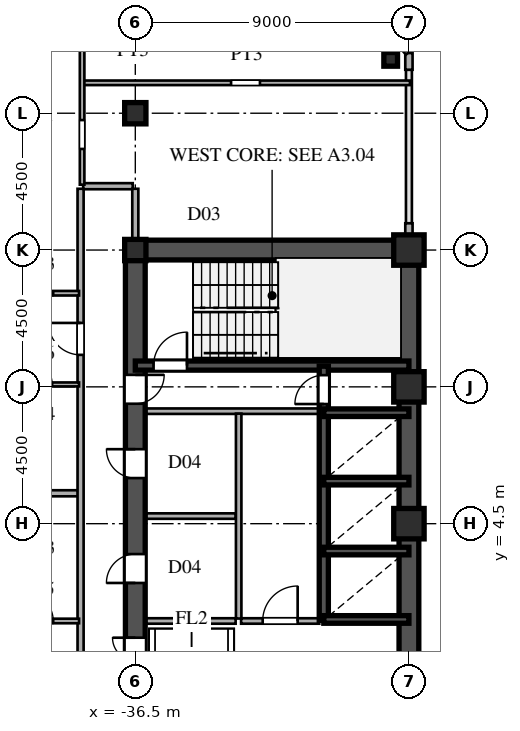
"""IFC4 building model, lengths in metres.
Left out: names, types, materials, properties, quantities, classifications, styles, units other than length and angle.
Written with IfcOpenShell. Run it as: python <this file> out.ifc"""

import sys

from ifc_helpers import new_model, si_unit, direction, frame, frame_2d, origin, origin_2d, place, context, subcontext, project, spatial, rectangle, hollow_rectangle, i_section, extrude, source, transform, mapped, element, fill, save


model = new_model("IFC4")
c1 = context("Model", 3, precision=1e-05, world=origin(), true_north=direction((0.0, 1.0)))
c2 = subcontext(c1, "Body", "Model", "MODEL_VIEW")
j1 = project(units=[si_unit("LENGTHUNIT", "METRE"), si_unit("PLANEANGLEUNIT", "RADIAN")], contexts=[c1])
p1 = place(None, origin())
s1 = spatial("IfcSite", under=j1, at=p1, CompositionType="ELEMENT")
p2 = place(p1, origin())
s2 = spatial("IfcBuilding", under=s1, at=p2, CompositionType="ELEMENT")
p3 = place(p2, frame((0.0, 0.0, 114.0)))
s3 = spatial("IfcBuildingStorey", under=s2, at=p3, CompositionType="ELEMENT", Elevation=114.0)
m1 = source(origin(), c2, "Body", "SweptSolid", [
    extrude(hollow_rectangle(XDim=1.0, YDim=1.0, WallThickness=0.042, at=origin_2d()), origin(), (0.0, 0.0, 1.0), 3.6),
])
for number, where, z_axis, x_axis in (
    (1, (-27.5, 4.5, 0.0), (0.0, 0.0, 1.0), (1.0, 0.0, 0.0)),
    (2, (-27.5, 9.0, 0.0), (0.0, 0.0, 1.0), (1.0, 0.0, 0.0)),
    (3, (-27.5, 13.5, 0.0), (0.0, 0.0, 1.0), (1.0, 0.0, 0.0)),
):
    element("IfcColumn", number, at=place(p3, frame(where, z_axis=z_axis, x_axis=x_axis)), inside=s3, PredefinedType="COLUMN", context=c2, shape_type="MappedRepresentation", body=[
        mapped(m1, transform((0.0, 0.0, 0.0), scale=1.0)),
    ])
m2 = source(origin(), c2, "Body", "SweptSolid", [
    extrude(i_section(OverallWidth=0.7, OverallDepth=0.7, WebThickness=0.028, FlangeThickness=0.045, at=origin_2d()), origin(), (0.0, 0.0, 1.0), 3.6),
])
for number, where, z_axis, x_axis in (
    (4, (-36.5, 13.5, 0.0), (0.0, 0.0, 1.0), (1.0, 0.0, 0.0)),
    (5, (-36.5, 18.0, 0.0), (0.0, 0.0, 1.0), (1.0, 0.0, 0.0)),
):
    element("IfcColumn", number, at=place(p3, frame(where, z_axis=z_axis, x_axis=x_axis)), inside=s3, PredefinedType="COLUMN", context=c2, shape_type="MappedRepresentation", body=[
        mapped(m2, transform((0.0, 0.0, 0.0), scale=1.0)),
    ])
m3 = source(origin(), c2, "Body", "SweptSolid", [
    extrude(hollow_rectangle(XDim=0.45, YDim=0.45, WallThickness=0.018, at=origin_2d()), origin(), (0.0, 0.0, 1.0), 3.6),
])
p4 = place(p3, frame((-28.1, 19.772, 0.0), z_axis=(0.0, 0.0, 1.0), x_axis=(1.0, 0.0, 0.0)))
e6 = element("IfcColumn", 6, at=p4, inside=s3, PredefinedType="COLUMN", context=c2, shape_type="MappedRepresentation", body=[
    mapped(m3, transform((0.0, 0.0, 0.0), scale=1.0)),
])
p5 = place(p3, frame((-27.5, 13.83, 0.0), z_axis=(0.0, 0.0, 1.0), x_axis=(0.0, 1.0, 0.0)))
e7 = element("IfcWall", 7, at=p5, inside=s3, PredefinedType="SOLIDWALL", context=c2, shape_type="SweptSolid", body=[
    extrude(rectangle(XDim=0.55, YDim=0.24, at=frame_2d((0.275, 0.0))), origin(), (0.0, 0.0, 1.0), 2.88),
])
p6 = place(p3, frame((-27.5, 19.43, 0.0), z_axis=(0.0, 0.0, 1.0), x_axis=(0.0, 1.0, 0.0)))
e8 = element("IfcWall", 8, at=p6, inside=s3, PredefinedType="SOLIDWALL", context=c2, shape_type="SweptSolid", body=[
    extrude(rectangle(XDim=0.55, YDim=0.24, at=frame_2d((0.275, 0.0))), origin(), (0.0, 0.0, 1.0), 3.38),
])
p7 = place(p3, frame((-27.507, 20.008, 0.0), z_axis=(0.0, 0.0, 1.0), x_axis=(-0.664337252513, 0.747432950119, 0.0)))
e9 = element("IfcWall", 9, at=p7, inside=s3, PredefinedType="SOLIDWALL", context=c2, shape_type="SweptSolid", body=[
    extrude(rectangle(XDim=1.14, YDim=0.24, at=frame_2d((0.57, 0.0))), origin(), (0.0, 0.0, 1.0), 3.38),
])
p8 = place(p3, frame((-27.5, 1.3, 0.0), z_axis=(0.0, 0.0, 1.0), x_axis=(0.0, 1.0, 0.0)))
e10 = element("IfcWall", 10, at=p8, inside=s3, PredefinedType="SHEAR", context=c2, shape_type="SweptSolid", body=[
    extrude(rectangle(XDim=12.2, YDim=0.65, at=frame_2d((6.1, 0.0))), origin(), (0.0, 0.0, 1.0), 3.38),
])
p9 = place(p3, frame((-27.5, -1.3, 0.0), z_axis=(0.0, 0.0, 1.0), x_axis=(0.0, 1.0, 0.0)))
e11 = element("IfcWall", 11, at=p9, inside=s3, PredefinedType="SHEAR", context=c2, shape_type="SweptSolid", body=[
    extrude(rectangle(XDim=2.6, YDim=0.65, at=frame_2d((1.3, 0.0))), origin(), (0.0, 0.0, 1.0), 3.38),
])
p10 = place(p3, frame((-36.5, 13.5, 0.0), z_axis=(0.0, 0.0, 1.0), x_axis=(1.0, 0.0, 0.0)))
e12 = element("IfcWall", 12, at=p10, inside=s3, PredefinedType="SHEAR", context=c2, shape_type="SweptSolid", body=[
    extrude(rectangle(XDim=9.0, YDim=0.65, at=frame_2d((4.5, 0.0))), origin(), (0.0, 0.0, 1.0), 3.38),
])
p11 = place(p3, frame((-36.5, -1.3, 0.0), z_axis=(0.0, 0.0, 1.0), x_axis=(0.0, 1.0, 0.0)))
e13 = element("IfcWall", 13, at=p11, inside=s3, PredefinedType="SHEAR", context=c2, shape_type="SweptSolid", body=[
    extrude(rectangle(XDim=2.6, YDim=0.65, at=frame_2d((1.3, 0.0))), origin(), (0.0, 0.0, 1.0), 3.38),
])
p12 = place(p11, frame((0.55, 0.0, 0.0)))
e14 = element("IfcOpeningElement", 14, at=p12, cuts=e13, PredefinedType="OPENING", context=c2, shape_type="SweptSolid", body=[
    extrude(rectangle(XDim=1.5, YDim=2.3, at=frame_2d((0.75, 1.15))), frame((0.0, 0.335, 0.0), z_axis=(0.0, -1.0, 0.0), x_axis=(1.0, 0.0, 0.0)), (0.0, 0.0, 1.0), 0.67),
])
p13 = place(p3, frame((-36.5, 8.2, 0.0), z_axis=(0.0, 0.0, 1.0), x_axis=(0.0, 1.0, 0.0)))
e15 = element("IfcWall", 15, at=p13, inside=s3, PredefinedType="SHEAR", context=c2, shape_type="SweptSolid", body=[
    extrude(rectangle(XDim=5.45, YDim=0.65, at=frame_2d((2.725, 0.0))), origin(), (0.0, 0.0, 1.0), 3.38),
])
p14 = place(p13, frame((0.245, 0.0, 0.0)))
e16 = element("IfcOpeningElement", 16, at=p14, cuts=e15, PredefinedType="OPENING", context=c2, shape_type="SweptSolid", body=[
    extrude(rectangle(XDim=0.95, YDim=2.15, at=frame_2d((0.475, 1.075))), frame((0.0, 0.335, 0.0), z_axis=(0.0, -1.0, 0.0), x_axis=(1.0, 0.0, 0.0)), (0.0, 0.0, 1.0), 0.67),
])
p15 = place(p3, frame((-36.5, 1.3, 0.0), z_axis=(0.0, 0.0, 1.0), x_axis=(0.0, 1.0, 0.0)))
e17 = element("IfcWall", 17, at=p15, inside=s3, PredefinedType="SHEAR", context=c2, shape_type="SweptSolid", body=[
    extrude(rectangle(XDim=3.45, YDim=0.65, at=frame_2d((1.725, 0.0))), origin(), (0.0, 0.0, 1.0), 3.38),
])
p16 = place(p15, frame((1.25, 0.0, 0.0)))
e18 = element("IfcOpeningElement", 18, at=p16, cuts=e17, PredefinedType="OPENING", context=c2, shape_type="SweptSolid", body=[
    extrude(rectangle(XDim=0.95, YDim=2.15, at=frame_2d((0.475, 1.075))), frame((0.0, 0.335, 0.0), z_axis=(0.0, -1.0, 0.0), x_axis=(1.0, 0.0, 0.0)), (0.0, 0.0, 1.0), 0.67),
])
p17 = place(p3, frame((-36.5, 4.75, 0.0), z_axis=(0.0, 0.0, 1.0), x_axis=(0.0, 1.0, 0.0)))
e19 = element("IfcWall", 19, at=p17, inside=s3, PredefinedType="SHEAR", context=c2, shape_type="SweptSolid", body=[
    extrude(rectangle(XDim=3.45, YDim=0.65, at=frame_2d((1.725, 0.0))), origin(), (0.0, 0.0, 1.0), 3.38),
])
p18 = place(p17, frame((1.25, 0.0, 0.0)))
e20 = element("IfcOpeningElement", 20, at=p18, cuts=e19, PredefinedType="OPENING", context=c2, shape_type="SweptSolid", body=[
    extrude(rectangle(XDim=0.95, YDim=2.15, at=frame_2d((0.475, 1.075))), frame((0.0, 0.335, 0.0), z_axis=(0.0, -1.0, 0.0), x_axis=(1.0, 0.0, 0.0)), (0.0, 0.0, 1.0), 0.67),
])
p19 = place(p3, frame((-36.5, 9.7, 0.0), z_axis=(0.0, 0.0, 1.0), x_axis=(1.0, 0.0, 0.0)))
e21 = element("IfcWall", 21, at=p19, inside=s3, PredefinedType="SHEAR", context=c2, shape_type="SweptSolid", body=[
    extrude(rectangle(XDim=9.0, YDim=0.3, at=frame_2d((4.5, 0.0))), origin(), (0.0, 0.0, 1.0), 3.38),
])
p20 = place(p19, frame((0.6, 0.0, 0.0)))
e22 = element("IfcOpeningElement", 22, at=p20, cuts=e21, PredefinedType="OPENING", context=c2, shape_type="SweptSolid", body=[
    extrude(rectangle(XDim=1.1, YDim=2.2, at=frame_2d((0.55, 1.1))), frame((0.0, 0.16, 0.0), z_axis=(0.0, -1.0, 0.0), x_axis=(1.0, 0.0, 0.0)), (0.0, 0.0, 1.0), 0.32),
])
for number, where, z_axis, x_axis in (
    (23, (-30.3, 1.35, 0.0), (0.0, 0.0, 1.0), (1.0, 0.0, 0.0)),
    (24, (-30.3, 3.6, 0.0), (0.0, 0.0, 1.0), (1.0, 0.0, 0.0)),
    (25, (-30.3, 5.9, 0.0), (0.0, 0.0, 1.0), (1.0, 0.0, 0.0)),
    (26, (-30.3, 8.15, 0.0), (0.0, 0.0, 1.0), (1.0, 0.0, 0.0)),
):
    element("IfcWall", number, at=place(p3, frame(where, z_axis=z_axis, x_axis=x_axis)), inside=s3, PredefinedType="SHEAR", context=c2, shape_type="SweptSolid", body=[
        extrude(rectangle(XDim=2.8, YDim=0.25, at=frame_2d((1.4, 0.0))), origin(), (0.0, 0.0, 1.0), 3.38),
    ])
p21 = place(p3, frame((-30.3, 1.32, 0.0), z_axis=(0.0, 0.0, 1.0), x_axis=(0.0, 1.0, 0.0)))
e27 = element("IfcWall", 27, at=p21, inside=s3, PredefinedType="SHEAR", context=c2, shape_type="SweptSolid", body=[
    extrude(rectangle(XDim=2.28, YDim=0.3, at=frame_2d((1.14, 0.0))), origin(), (0.0, 0.0, 1.0), 3.38),
])
p22 = place(p3, frame((-30.3, 3.6, 0.0), z_axis=(0.0, 0.0, 1.0), x_axis=(0.0, 1.0, 0.0)))
e28 = element("IfcWall", 28, at=p22, inside=s3, PredefinedType="SHEAR", context=c2, shape_type="SweptSolid", body=[
    extrude(rectangle(XDim=2.3, YDim=0.3, at=frame_2d((1.15, 0.0))), origin(), (0.0, 0.0, 1.0), 3.38),
])
p23 = place(p3, frame((-30.3, 5.9, 0.0), z_axis=(0.0, 0.0, 1.0), x_axis=(0.0, 1.0, 0.0)))
e29 = element("IfcWall", 29, at=p23, inside=s3, PredefinedType="SHEAR", context=c2, shape_type="SweptSolid", body=[
    extrude(rectangle(XDim=2.25, YDim=0.3, at=frame_2d((1.125, 0.0))), origin(), (0.0, 0.0, 1.0), 3.38),
])
p24 = place(p3, frame((-30.3, 8.15, 0.0), z_axis=(0.0, 0.0, 1.0), x_axis=(0.0, 1.0, 0.0)))
e30 = element("IfcWall", 30, at=p24, inside=s3, PredefinedType="SHEAR", context=c2, shape_type="SweptSolid", body=[
    extrude(rectangle(XDim=1.53, YDim=0.3, at=frame_2d((0.765, 0.0))), origin(), (0.0, 0.0, 1.0), 3.38),
])
p25 = place(p24, frame((0.285, 0.0, 0.0)))
e31 = element("IfcOpeningElement", 31, at=p25, cuts=e30, PredefinedType="OPENING", context=c2, shape_type="SweptSolid", body=[
    extrude(rectangle(XDim=0.95, YDim=2.15, at=frame_2d((0.475, 1.075))), frame((0.0, 0.16, 0.0), z_axis=(0.0, -1.0, 0.0), x_axis=(1.0, 0.0, 0.0)), (0.0, 0.0, 1.0), 0.32),
])
p26 = place(p3, frame((-36.15, 8.2, 0.0), z_axis=(0.0, 0.0, 1.0), x_axis=(1.0, 0.0, 0.0)))
e32 = element("IfcWall", 32, at=p26, inside=s3, PredefinedType="PARTITIONING", context=c2, shape_type="SweptSolid", body=[
    extrude(rectangle(XDim=5.7, YDim=0.18, at=frame_2d((2.85, 0.0))), origin(), (0.0, 0.0, 1.0), 3.38),
])
p27 = place(p3, frame((-33.1, 1.38, 0.0), z_axis=(0.0, 0.0, 1.0), x_axis=(0.0, 1.0, 0.0)))
e33 = element("IfcWall", 33, at=p27, inside=s3, PredefinedType="PARTITIONING", context=c2, shape_type="SweptSolid", body=[
    extrude(rectangle(XDim=6.74, YDim=0.18, at=frame_2d((3.37, 0.0))), origin(), (0.0, 0.0, 1.0), 3.38),
])
p28 = place(p3, frame((-33.02, 1.3, 0.0), z_axis=(0.0, 0.0, 1.0), x_axis=(1.0, 0.0, 0.0)))
e34 = element("IfcWall", 34, at=p28, inside=s3, PredefinedType="PARTITIONING", context=c2, shape_type="SweptSolid", body=[
    extrude(rectangle(XDim=2.57, YDim=0.18, at=frame_2d((1.285, 0.0))), origin(), (0.0, 0.0, 1.0), 3.38),
])
p29 = place(p28, frame((0.71, 0.0, 0.0)))
e35 = element("IfcOpeningElement", 35, at=p29, cuts=e34, PredefinedType="OPENING", context=c2, shape_type="SweptSolid", body=[
    extrude(rectangle(XDim=1.15, YDim=2.2, at=frame_2d((0.575, 1.1))), frame((0.0, 0.1, 0.0), z_axis=(0.0, -1.0, 0.0), x_axis=(1.0, 0.0, 0.0)), (0.0, 0.0, 1.0), 0.2),
])
for number, where, z_axis, x_axis in (
    (36, (-36.15, 1.3, 0.0), (0.0, 0.0, 1.0), (1.0, 0.0, 0.0)),
    (37, (-36.15, 4.75, 0.0), (0.0, 0.0, 1.0), (1.0, 0.0, 0.0)),
):
    element("IfcWall", number, at=place(p3, frame(where, z_axis=z_axis, x_axis=x_axis)), inside=s3, PredefinedType="PARTITIONING", context=c2, shape_type="SweptSolid", body=[
        extrude(rectangle(XDim=2.95, YDim=0.18, at=frame_2d((1.475, 0.0))), origin(), (0.0, 0.0, 1.0), 3.38),
    ])
p30 = place(p3, frame((-41.0, 1.3, 0.0), z_axis=(0.0, 0.0, 1.0), x_axis=(1.0, 0.0, 0.0)))
e38 = element("IfcWall", 38, at=p30, inside=s3, PredefinedType="PARTITIONING", context=c2, shape_type="SweptSolid", body=[
    extrude(rectangle(XDim=2.65, YDim=0.15, at=frame_2d((1.325, 0.0))), origin(), (0.0, 0.0, 1.0), 3.38),
])
p31 = place(p30, frame((0.85, 0.0, 0.0)))
e39 = element("IfcOpeningElement", 39, at=p31, cuts=e38, PredefinedType="OPENING", context=c2, shape_type="SweptSolid", body=[
    extrude(rectangle(XDim=0.95, YDim=2.15, at=frame_2d((0.475, 1.075))), frame((0.0, 0.085, 0.0), z_axis=(0.0, -1.0, 0.0), x_axis=(1.0, 0.0, 0.0)), (0.0, 0.0, 1.0), 0.17),
])
p32 = place(p3, frame((-68.458, 5.5, 0.0), z_axis=(0.0, 0.0, 1.0), x_axis=(1.0, 0.0, 0.0)))
e40 = element("IfcWall", 40, at=p32, inside=s3, PredefinedType="PARTITIONING", context=c2, shape_type="SweptSolid", body=[
    extrude(rectangle(XDim=30.079, YDim=0.2, at=frame_2d((15.039, 0.0))), origin(), (0.0, 0.0, 1.0), 3.38),
])
p33 = place(p3, frame((-41.0, 9.08, 0.0), z_axis=(0.0, 0.0, 1.0), x_axis=(1.0, 0.0, 0.0)))
e41 = element("IfcWall", 41, at=p33, inside=s3, PredefinedType="PARTITIONING", context=c2, shape_type="SweptSolid", body=[
    extrude(rectangle(XDim=2.65, YDim=0.13, at=frame_2d((1.325, 0.0))), origin(), (0.0, 0.0, 1.0), 3.38),
])
p34 = place(p33, frame((0.885, 0.0, 0.0)))
e42 = element("IfcOpeningElement", 42, at=p34, cuts=e41, PredefinedType="OPENING", context=c2, shape_type="SweptSolid", body=[
    extrude(rectangle(XDim=0.88, YDim=2.1, at=frame_2d((0.44, 1.05))), frame((0.0, 0.075, 0.0), z_axis=(0.0, -1.0, 0.0), x_axis=(1.0, 0.0, 0.0)), (0.0, 0.0, 1.0), 0.15),
])
p35 = place(p3, frame((-41.0, 12.08, 0.0), z_axis=(0.0, 0.0, 1.0), x_axis=(1.0, 0.0, 0.0)))
e43 = element("IfcWall", 43, at=p35, inside=s3, PredefinedType="PARTITIONING", context=c2, shape_type="SweptSolid", body=[
    extrude(rectangle(XDim=2.65, YDim=0.15, at=frame_2d((1.325, 0.0))), origin(), (0.0, 0.0, 1.0), 3.38),
])
p36 = place(p35, frame((0.85, 0.0, 0.0)))
e44 = element("IfcOpeningElement", 44, at=p36, cuts=e43, PredefinedType="OPENING", context=c2, shape_type="SweptSolid", body=[
    extrude(rectangle(XDim=0.95, YDim=2.15, at=frame_2d((0.475, 1.075))), frame((0.0, 0.085, 0.0), z_axis=(0.0, -1.0, 0.0), x_axis=(1.0, 0.0, 0.0)), (0.0, 0.0, 1.0), 0.17),
])
p37 = place(p3, frame((-38.215, 15.6, 0.0), z_axis=(0.0, 0.0, 1.0), x_axis=(1.0, 0.0, 0.0)))
e45 = element("IfcWall", 45, at=p37, inside=s3, PredefinedType="PARTITIONING", context=c2, shape_type="SweptSolid", body=[
    extrude(rectangle(XDim=1.63, YDim=0.2, at=frame_2d((0.815, 0.0))), origin(), (0.0, 0.0, 1.0), 3.38),
])
p38 = place(p3, frame((-38.2, 19.0, 0.0), z_axis=(0.0, 0.0, 1.0), x_axis=(1.0, 0.0, 0.0)))
e46 = element("IfcWall", 46, at=p38, inside=s3, PredefinedType="PARTITIONING", context=c2, shape_type="SweptSolid", body=[
    extrude(rectangle(XDim=10.735, YDim=0.15, at=frame_2d((5.367, 0.0))), origin(), (0.0, 0.0, 1.0), 3.38),
])
p39 = place(p38, frame((4.85, 0.0, 0.0)))
e47 = element("IfcOpeningElement", 47, at=p39, cuts=e46, PredefinedType="OPENING", context=c2, shape_type="SweptSolid", body=[
    extrude(rectangle(XDim=0.95, YDim=2.15, at=frame_2d((0.475, 1.075))), frame((0.0, 0.085, 0.0), z_axis=(0.0, -1.0, 0.0), x_axis=(1.0, 0.0, 0.0)), (0.0, 0.0, 1.0), 0.17),
])
p40 = place(p3, frame((-38.3, -15.515, 0.0), z_axis=(0.0, 0.0, 1.0), x_axis=(0.0, 1.0, 0.0)))
e48 = element("IfcWall", 48, at=p40, inside=s3, PredefinedType="PARTITIONING", context=c2, shape_type="SweptSolid", body=[
    extrude(rectangle(XDim=31.03, YDim=0.2, at=frame_2d((15.515, 0.0))), origin(), (0.0, 0.0, 1.0), 3.38),
])
p41 = place(p40, frame((2.345, 0.0, 0.0)))
e49 = element("IfcOpeningElement", 49, at=p41, cuts=e48, PredefinedType="OPENING", context=c2, shape_type="SweptSolid", body=[
    extrude(rectangle(XDim=1.05, YDim=2.25, at=frame_2d((0.525, 1.125))), frame((0.0, 0.11, 0.0), z_axis=(0.0, -1.0, 0.0), x_axis=(1.0, 0.0, 0.0)), (0.0, 0.0, 1.0), 0.22),
])
p42 = place(p40, frame((13.28, 0.0, 0.0)))
e50 = element("IfcOpeningElement", 50, at=p42, cuts=e48, PredefinedType="OPENING", context=c2, shape_type="SweptSolid", body=[
    extrude(rectangle(XDim=1.05, YDim=2.25, at=frame_2d((0.525, 1.125))), frame((0.0, 0.11, 0.0), z_axis=(0.0, -1.0, 0.0), x_axis=(1.0, 0.0, 0.0)), (0.0, 0.0, 1.0), 0.22),
])
p43 = place(p40, frame((25.567, 0.0, 0.0)))
e51 = element("IfcOpeningElement", 51, at=p43, cuts=e48, PredefinedType="OPENING", context=c2, shape_type="SweptSolid", body=[
    extrude(rectangle(XDim=1.05, YDim=2.25, at=frame_2d((0.525, 1.125))), frame((0.0, 0.11, 0.0), z_axis=(0.0, -1.0, 0.0), x_axis=(1.0, 0.0, 0.0)), (0.0, 0.0, 1.0), 0.22),
])
p44 = place(p3, frame((-38.25, 15.65, 0.0), z_axis=(0.0, 0.0, 1.0), x_axis=(0.0, 1.0, 0.0)))
e52 = element("IfcWall", 52, at=p44, inside=s3, PredefinedType="PARTITIONING", context=c2, shape_type="SweptSolid", body=[
    extrude(rectangle(XDim=5.421, YDim=0.15, at=frame_2d((2.71, 0.0))), origin(), (0.0, 0.0, 1.0), 3.38),
])
p45 = place(p44, frame((1.175, 0.0, 0.0)))
e53 = element("IfcOpeningElement", 53, at=p45, cuts=e52, PredefinedType="OPENING", context=c2, shape_type="SweptSolid", body=[
    extrude(rectangle(XDim=0.95, YDim=2.15, at=frame_2d((0.475, 1.075))), frame((0.0, 0.085, 0.0), z_axis=(0.0, -1.0, 0.0), x_axis=(1.0, 0.0, 0.0)), (0.0, 0.0, 1.0), 0.17),
])
p46 = place(p3, frame((-36.5, 13.83, 0.0), z_axis=(0.0, 0.0, 1.0), x_axis=(0.0, 1.0, 0.0)))
e54 = element("IfcWall", 54, at=p46, inside=s3, PredefinedType="PARTITIONING", context=c2, shape_type="SweptSolid", body=[
    extrude(rectangle(XDim=1.685, YDim=0.2, at=frame_2d((0.842, 0.0))), origin(), (0.0, 0.0, 1.0), 2.78),
])
m4 = source(origin(), c2, "Body", "SweptSolid", [
    extrude(rectangle(XDim=1.5, YDim=2.3, at=frame_2d((0.75, 1.15))), frame((0.0, 0.025, 0.0), z_axis=(0.0, -1.0, 0.0), x_axis=(1.0, 0.0, 0.0)), (0.0, 0.0, 1.0), 0.05),
])
p47 = place(p12, origin())
e55 = element("IfcDoor", 55, at=p47, inside=s3, OperationType="DOUBLE_SWING_LEFT", PredefinedType="DOOR", context=c2, shape_type="MappedRepresentation", body=[
    mapped(m4, transform((0.0, 0.0, 0.0), scale=1.0)),
])
fill(e14, e55)
m5 = source(origin(), c2, "Body", "SweptSolid", [
    extrude(rectangle(XDim=0.95, YDim=2.15, at=frame_2d((0.475, 1.075))), frame((0.0, 0.025, 0.0), z_axis=(0.0, -1.0, 0.0), x_axis=(1.0, 0.0, 0.0)), (0.0, 0.0, 1.0), 0.05),
])
p48 = place(p14, frame((0.95, 0.0, 0.0), z_axis=(0.0, 0.0, 1.0), x_axis=(-1.0, 0.0, 0.0)))
e56 = element("IfcDoor", 56, at=p48, inside=s3, OperationType="SINGLE_SWING_RIGHT", PredefinedType="DOOR", context=c2, shape_type="MappedRepresentation", body=[
    mapped(m5, transform((0.0, 0.0, 0.0), scale=1.0)),
])
fill(e16, e56)
p49 = place(p16, origin())
e57 = element("IfcDoor", 57, at=p49, inside=s3, OperationType="SINGLE_SWING_LEFT", PredefinedType="DOOR", context=c2, shape_type="MappedRepresentation", body=[
    mapped(m5, transform((0.0, 0.0, 0.0), scale=1.0)),
])
fill(e18, e57)
p50 = place(p18, origin())
e58 = element("IfcDoor", 58, at=p50, inside=s3, OperationType="SINGLE_SWING_RIGHT", PredefinedType="DOOR", context=c2, shape_type="MappedRepresentation", body=[
    mapped(m5, transform((0.0, 0.0, 0.0), scale=1.0)),
])
fill(e20, e58)
m6 = source(origin(), c2, "Body", "SweptSolid", [
    extrude(rectangle(XDim=1.1, YDim=2.2, at=frame_2d((0.55, 1.1))), frame((0.0, 0.025, 0.0), z_axis=(0.0, -1.0, 0.0), x_axis=(1.0, 0.0, 0.0)), (0.0, 0.0, 1.0), 0.05),
])
p51 = place(p20, origin())
e59 = element("IfcDoor", 59, at=p51, inside=s3, OperationType="SINGLE_SWING_RIGHT", PredefinedType="DOOR", context=c2, shape_type="MappedRepresentation", body=[
    mapped(m6, transform((0.0, 0.0, 0.0), scale=1.0)),
])
fill(e22, e59)
p52 = place(p25, origin())
e60 = element("IfcDoor", 60, at=p52, inside=s3, OperationType="SINGLE_SWING_LEFT", PredefinedType="DOOR", context=c2, shape_type="MappedRepresentation", body=[
    mapped(m5, transform((0.0, 0.0, 0.0), scale=1.0)),
])
fill(e31, e60)
m7 = source(origin(), c2, "Body", "SweptSolid", [
    extrude(rectangle(XDim=1.15, YDim=2.2, at=frame_2d((0.575, 1.1))), frame((0.0, 0.025, 0.0), z_axis=(0.0, -1.0, 0.0), x_axis=(1.0, 0.0, 0.0)), (0.0, 0.0, 1.0), 0.05),
])
p53 = place(p29, origin())
e61 = element("IfcDoor", 61, at=p53, inside=s3, OperationType="SINGLE_SWING_RIGHT", PredefinedType="DOOR", context=c2, shape_type="MappedRepresentation", body=[
    mapped(m7, transform((0.0, 0.0, 0.0), scale=1.0)),
])
fill(e35, e61)
m8 = source(origin(), c2, "Body", "SweptSolid", [
    extrude(rectangle(XDim=0.95, YDim=2.15, at=frame_2d((0.475, 1.075))), frame((0.0, 0.025, 0.0), z_axis=(0.0, -1.0, 0.0), x_axis=(1.0, 0.0, 0.0)), (0.0, 0.0, 1.0), 0.05),
])
p54 = place(p31, origin())
e62 = element("IfcDoor", 62, at=p54, inside=s3, OperationType="SINGLE_SWING_LEFT", PredefinedType="DOOR", context=c2, shape_type="MappedRepresentation", body=[
    mapped(m8, transform((0.0, 0.0, 0.0), scale=1.0)),
])
fill(e39, e62)
m9 = source(origin(), c2, "Body", "SweptSolid", [
    extrude(rectangle(XDim=0.88, YDim=2.1, at=frame_2d((0.44, 1.05))), frame((0.0, 0.025, 0.0), z_axis=(0.0, -1.0, 0.0), x_axis=(1.0, 0.0, 0.0)), (0.0, 0.0, 1.0), 0.05),
])
p55 = place(p34, origin())
e63 = element("IfcDoor", 63, at=p55, inside=s3, OperationType="SINGLE_SWING_LEFT", PredefinedType="DOOR", context=c2, shape_type="MappedRepresentation", body=[
    mapped(m9, transform((0.0, 0.0, 0.0), scale=1.0)),
])
fill(e42, e63)
m10 = source(origin(), c2, "Body", "SweptSolid", [
    extrude(rectangle(XDim=1.05, YDim=2.25, at=frame_2d((0.525, 1.125))), frame((0.0, 0.025, 0.0), z_axis=(0.0, -1.0, 0.0), x_axis=(1.0, 0.0, 0.0)), (0.0, 0.0, 1.0), 0.05),
])
p56 = place(p43, origin())
e64 = element("IfcDoor", 64, at=p56, inside=s3, OperationType="SINGLE_SWING_RIGHT", PredefinedType="DOOR", context=c2, shape_type="MappedRepresentation", body=[
    mapped(m10, transform((0.0, 0.0, 0.0), scale=1.0)),
])
fill(e51, e64)
save(model, sys.argv[1])
